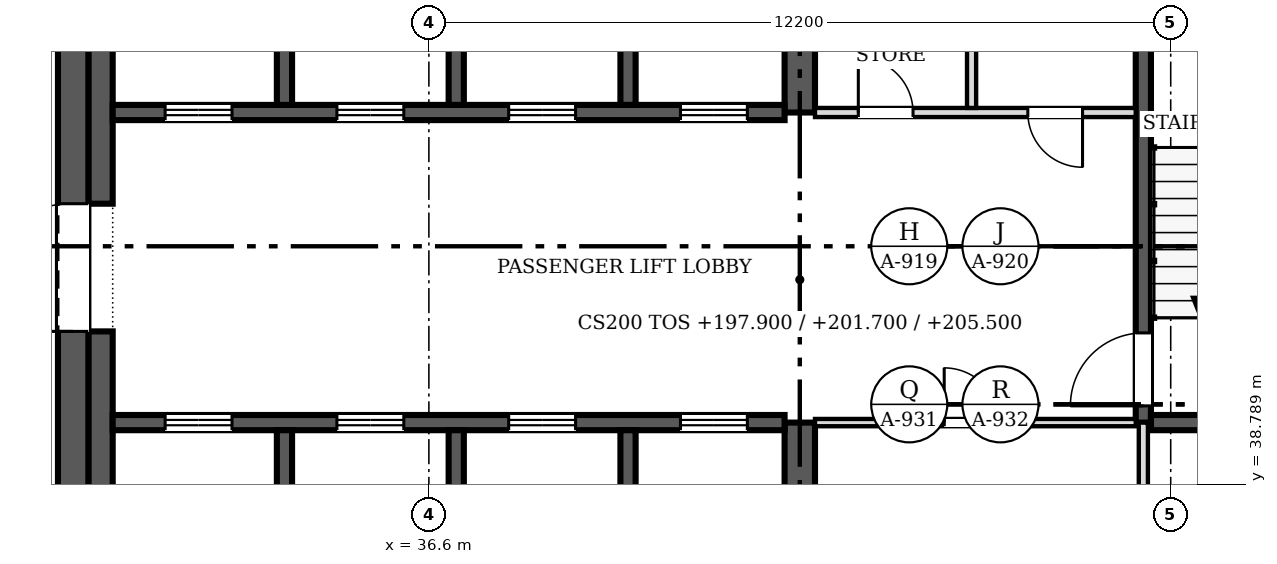
"""IFC4 building model, lengths in metres.
Left out: names, types, materials, properties, quantities, classifications, styles, units other than length and angle.
Written with IfcOpenShell. Run it as: python <this file> out.ifc"""

import sys

from ifc_helpers import new_model, si_unit, direction, frame, frame_2d, origin, place, context, subcontext, project, spatial, rectangle, extrude, source, transform, mapped, element, fill, save


model = new_model("IFC4")
c1 = context("Model", 3, precision=1e-05, world=origin(), true_north=direction((0.0, 1.0)))
c2 = subcontext(c1, "Body", "Model", "MODEL_VIEW")
j1 = project(units=[si_unit("LENGTHUNIT", "METRE"), si_unit("PLANEANGLEUNIT", "RADIAN")], contexts=[c1])
p1 = place(None, origin())
s1 = spatial("IfcSite", under=j1, at=p1, CompositionType="ELEMENT")
p2 = place(p1, origin())
s2 = spatial("IfcBuilding", under=s1, at=p2, CompositionType="ELEMENT")
p3 = place(p2, frame((0.0, 0.0, 197.9)))
s3 = spatial("IfcBuildingStorey", under=s2, at=p3, CompositionType="ELEMENT", Elevation=197.9)
p4 = place(p3, frame((30.75, 24.9, 0.0), z_axis=(0.0, 0.0, 1.0), x_axis=(0.0, 1.0, 0.0)))
e1 = element("IfcWall", 1, at=p4, inside=s3, PredefinedType="SHEAR", context=c2, shape_type="SweptSolid", body=[
    extrude(rectangle(XDim=23.4, YDim=0.5, at=frame_2d((11.7, 0.0))), origin(), (0.0, 0.0, 1.0), 3.8),
])
m1 = source(origin(), c2, "Body", "SweptSolid", [
    extrude(rectangle(XDim=2.1, YDim=2.4, at=frame_2d((1.05, 1.2))), frame((0.0, 0.26, 0.0), z_axis=(0.0, -1.0, 0.0), x_axis=(1.0, 0.0, 0.0)), (0.0, 0.0, 1.0), 0.52),
])
p5 = place(p4, frame((4.9, 0.0, 0.0)))
e2 = element("IfcOpeningElement", 2, at=p5, cuts=e1, PredefinedType="OPENING", context=c2, shape_type="MappedRepresentation", body=[
    mapped(m1, transform((0.0, 0.0, 0.0), scale=1.0)),
])
p6 = place(p4, frame((16.4, 0.0, 0.0)))
e3 = element("IfcOpeningElement", 3, at=p6, cuts=e1, PredefinedType="OPENING", context=c2, shape_type="MappedRepresentation", body=[
    mapped(m1, transform((0.0, 0.0, 0.0), scale=1.0)),
])
p7 = place(p3, frame((31.2, 31.9, 0.0), z_axis=(0.0, 0.0, 1.0), x_axis=(0.0, 1.0, 0.0)))
e4 = element("IfcWall", 4, at=p7, inside=s3, PredefinedType="SOLIDWALL", context=c2, shape_type="SweptSolid", body=[
    extrude(rectangle(XDim=9.4, YDim=0.4, at=frame_2d((4.7, 0.0))), origin(), (0.0, 0.0, 1.0), 3.8),
])
p8 = place(p3, frame((31.2, 43.4, 0.0), z_axis=(0.0, 0.0, 1.0), x_axis=(0.0, 1.0, 0.0)))
e5 = element("IfcWall", 5, at=p8, inside=s3, PredefinedType="SOLIDWALL", context=c2, shape_type="SweptSolid", body=[
    extrude(rectangle(XDim=4.5, YDim=0.4, at=frame_2d((2.25, 0.0))), origin(), (0.0, 0.0, 1.0), 3.8),
])
p9 = place(p3, frame((42.7, 36.85, 0.0), z_axis=(0.0, 0.0, 1.0), x_axis=(0.0, 1.0, 0.0)))
e6 = element("IfcWall", 6, at=p9, inside=s3, PredefinedType="SHEAR", context=c2, shape_type="SweptSolid", body=[
    extrude(rectangle(XDim=2.95, YDim=0.5, at=frame_2d((1.475, 0.0))), origin(), (0.0, 0.0, 1.0), 3.8),
])
p10 = place(p3, frame((42.7, 44.9, 0.0), z_axis=(0.0, 0.0, 1.0), x_axis=(0.0, 1.0, 0.0)))
e7 = element("IfcWall", 7, at=p10, inside=s3, PredefinedType="SHEAR", context=c2, shape_type="SweptSolid", body=[
    extrude(rectangle(XDim=3.0, YDim=0.5, at=frame_2d((1.5, 0.0))), origin(), (0.0, 0.0, 1.0), 3.8),
])
p11 = place(p3, frame((31.4, 39.8, 0.0), z_axis=(0.0, 0.0, 1.0), x_axis=(1.0, 0.0, 0.0)))
e8 = element("IfcWall", 8, at=p11, inside=s3, PredefinedType="SOLIDWALL", context=c2, shape_type="SweptSolid", body=[
    extrude(rectangle(XDim=11.05, YDim=0.25, at=frame_2d((5.525, 0.0))), origin(), (0.0, 0.0, 1.0), 3.8),
])
m2 = source(origin(), c2, "Body", "SweptSolid", [
    extrude(rectangle(XDim=1.1, YDim=2.1, at=frame_2d((0.55, 1.05))), frame((0.0, 0.135, 0.0), z_axis=(0.0, -1.0, 0.0), x_axis=(1.0, 0.0, 0.0)), (0.0, 0.0, 1.0), 0.27),
])
p12 = place(p11, frame((0.863, 0.0, 0.0)))
e9 = element("IfcOpeningElement", 9, at=p12, cuts=e8, PredefinedType="OPENING", context=c2, shape_type="MappedRepresentation", body=[
    mapped(m2, transform((0.0, 0.0, 0.0), scale=1.0)),
])
p13 = place(p11, frame((3.688, 0.0, 0.0)))
e10 = element("IfcOpeningElement", 10, at=p13, cuts=e8, PredefinedType="OPENING", context=c2, shape_type="MappedRepresentation", body=[
    mapped(m2, transform((0.0, 0.0, 0.0), scale=1.0)),
])
p14 = place(p11, frame((6.512, 0.0, 0.0)))
e11 = element("IfcOpeningElement", 11, at=p14, cuts=e8, PredefinedType="OPENING", context=c2, shape_type="MappedRepresentation", body=[
    mapped(m2, transform((0.0, 0.0, 0.0), scale=1.0)),
])
p15 = place(p11, frame((9.337, 0.0, 0.0)))
e12 = element("IfcOpeningElement", 12, at=p15, cuts=e8, PredefinedType="OPENING", context=c2, shape_type="MappedRepresentation", body=[
    mapped(m2, transform((0.0, 0.0, 0.0), scale=1.0)),
])
p16 = place(p3, frame((42.45, 44.9, 0.0), z_axis=(0.0, 0.0, 1.0), x_axis=(-1.0, 0.0, 0.0)))
e13 = element("IfcWall", 13, at=p16, inside=s3, PredefinedType="SOLIDWALL", context=c2, shape_type="SweptSolid", body=[
    extrude(rectangle(XDim=11.05, YDim=0.25, at=frame_2d((5.525, 0.0))), origin(), (0.0, 0.0, 1.0), 3.8),
])
p17 = place(p16, frame((9.087, 0.0, 0.0)))
e14 = element("IfcOpeningElement", 14, at=p17, cuts=e13, PredefinedType="OPENING", context=c2, shape_type="MappedRepresentation", body=[
    mapped(m2, transform((0.0, 0.0, 0.0), scale=1.0)),
])
p18 = place(p16, frame((6.262, 0.0, 0.0)))
e15 = element("IfcOpeningElement", 15, at=p18, cuts=e13, PredefinedType="OPENING", context=c2, shape_type="MappedRepresentation", body=[
    mapped(m2, transform((0.0, 0.0, 0.0), scale=1.0)),
])
p19 = place(p16, frame((3.438, 0.0, 0.0)))
e16 = element("IfcOpeningElement", 16, at=p19, cuts=e13, PredefinedType="OPENING", context=c2, shape_type="MappedRepresentation", body=[
    mapped(m2, transform((0.0, 0.0, 0.0), scale=1.0)),
])
p20 = place(p16, frame((0.613, 0.0, 0.0)))
e17 = element("IfcOpeningElement", 17, at=p20, cuts=e13, PredefinedType="OPENING", context=c2, shape_type="MappedRepresentation", body=[
    mapped(m2, transform((0.0, 0.0, 0.0), scale=1.0)),
])
p21 = place(p3, frame((48.35, 47.9, 0.0), z_axis=(0.0, 0.0, 1.0), x_axis=(0.0, -1.0, 0.0)))
e18 = element("IfcWall", 18, at=p21, inside=s3, PredefinedType="SOLIDWALL", context=c2, shape_type="SweptSolid", body=[
    extrude(rectangle(XDim=8.1, YDim=0.25, at=frame_2d((4.05, 0.0))), origin(), (0.0, 0.0, 1.0), 3.8),
])
m3 = source(origin(), c2, "Body", "SweptSolid", [
    extrude(rectangle(XDim=1.2, YDim=2.1, at=frame_2d((0.6, 1.05))), frame((0.0, 0.135, 0.0), z_axis=(0.0, -1.0, 0.0), x_axis=(1.0, 0.0, 0.0)), (0.0, 0.0, 1.0), 0.27),
])
p22 = place(p21, frame((6.625, 0.0, 0.0)))
e19 = element("IfcOpeningElement", 19, at=p22, cuts=e18, PredefinedType="OPENING", context=c2, shape_type="MappedRepresentation", body=[
    mapped(m3, transform((0.0, 0.0, 0.0), scale=1.0)),
])
p23 = place(p3, frame((48.475, 39.8, 0.0), z_axis=(0.0, 0.0, 1.0), x_axis=(1.0, 0.0, 0.0)))
e20 = element("IfcWall", 20, at=p23, inside=s3, PredefinedType="SOLIDWALL", context=c2, shape_type="SweptSolid", body=[
    extrude(rectangle(XDim=3.4, YDim=0.25, at=frame_2d((1.7, 0.0))), origin(), (0.0, 0.0, 1.0), 3.8),
])
for number, where, z_axis, x_axis in (
    (21, (34.225, 36.85, 0.0), (0.0, 0.0, 1.0), (0.0, 1.0, 0.0)),
    (22, (37.05, 36.85, 0.0), (0.0, 0.0, 1.0), (0.0, 1.0, 0.0)),
    (23, (39.875, 36.85, 0.0), (0.0, 0.0, 1.0), (0.0, 1.0, 0.0)),
):
    element("IfcWall", number, at=place(p3, frame(where, z_axis=z_axis, x_axis=x_axis)), inside=s3, PredefinedType="SOLIDWALL", context=c2, shape_type="SweptSolid", body=[
        extrude(rectangle(XDim=2.825, YDim=0.25, at=frame_2d((1.413, 0.0))), origin(), (0.0, 0.0, 1.0), 3.8),
    ])
for number, where, z_axis, x_axis in (
    (24, (34.225, 45.025, 0.0), (0.0, 0.0, 1.0), (0.0, 1.0, 0.0)),
    (25, (37.05, 45.025, 0.0), (0.0, 0.0, 1.0), (0.0, 1.0, 0.0)),
    (26, (39.875, 45.025, 0.0), (0.0, 0.0, 1.0), (0.0, 1.0, 0.0)),
):
    element("IfcWall", number, at=place(p3, frame(where, z_axis=z_axis, x_axis=x_axis)), inside=s3, PredefinedType="SOLIDWALL", context=c2, shape_type="SweptSolid", body=[
        extrude(rectangle(XDim=2.875, YDim=0.25, at=frame_2d((1.438, 0.0))), origin(), (0.0, 0.0, 1.0), 3.8),
    ])
p24 = place(p3, frame((48.225, 39.8, 0.0), z_axis=(0.0, 0.0, 1.0), x_axis=(-1.0, 0.0, 0.0)))
e27 = element("IfcWall", 27, at=p24, inside=s3, PredefinedType="PARTITIONING", context=c2, shape_type="SweptSolid", body=[
    extrude(rectangle(XDim=5.275, YDim=0.12, at=frame_2d((2.638, 0.0))), origin(), (0.0, 0.0, 1.0), 3.6),
])
m4 = source(origin(), c2, "Body", "SweptSolid", [
    extrude(rectangle(XDim=0.9, YDim=2.1, at=frame_2d((0.45, 1.05))), frame((0.0, 0.07, 0.0), z_axis=(0.0, -1.0, 0.0), x_axis=(1.0, 0.0, 0.0)), (0.0, 0.0, 1.0), 0.14),
])
p25 = place(p24, frame((2.25, 0.0, 0.0)))
e28 = element("IfcOpeningElement", 28, at=p25, cuts=e27, PredefinedType="OPENING", context=c2, shape_type="MappedRepresentation", body=[
    mapped(m4, transform((0.0, 0.0, 0.0), scale=1.0)),
])
p26 = place(p3, frame((42.95, 44.9, 0.0), z_axis=(0.0, 0.0, 1.0), x_axis=(1.0, 0.0, 0.0)))
e29 = element("IfcWall", 29, at=p26, inside=s3, PredefinedType="PARTITIONING", context=c2, shape_type="SweptSolid", body=[
    extrude(rectangle(XDim=5.275, YDim=0.15, at=frame_2d((2.638, 0.0))), origin(), (0.0, 0.0, 1.0), 3.6),
])
m5 = source(origin(), c2, "Body", "SweptSolid", [
    extrude(rectangle(XDim=0.9, YDim=2.1, at=frame_2d((0.45, 1.05))), frame((0.0, 0.085, 0.0), z_axis=(0.0, -1.0, 0.0), x_axis=(1.0, 0.0, 0.0)), (0.0, 0.0, 1.0), 0.17),
])
p27 = place(p26, frame((0.712, 0.0, 0.0)))
e30 = element("IfcOpeningElement", 30, at=p27, cuts=e29, PredefinedType="OPENING", context=c2, shape_type="MappedRepresentation", body=[
    mapped(m5, transform((0.0, 0.0, 0.0), scale=1.0)),
])
p28 = place(p26, frame((3.5, 0.0, 0.0)))
e31 = element("IfcOpeningElement", 31, at=p28, cuts=e29, PredefinedType="OPENING", context=c2, shape_type="MappedRepresentation", body=[
    mapped(m5, transform((0.0, 0.0, 0.0), scale=1.0)),
])
p29 = place(p3, frame((48.35, 36.85, 0.0), z_axis=(0.0, 0.0, 1.0), x_axis=(0.0, 1.0, 0.0)))
e32 = element("IfcWall", 32, at=p29, inside=s3, PredefinedType="PARTITIONING", context=c2, shape_type="SweptSolid", body=[
    extrude(rectangle(XDim=2.95, YDim=0.15, at=frame_2d((1.475, 0.0))), origin(), (0.0, 0.0, 1.0), 3.6),
])
p30 = place(p3, frame((45.525, 44.975, 0.0), z_axis=(0.0, 0.0, 1.0), x_axis=(0.0, 1.0, 0.0)))
e33 = element("IfcWall", 33, at=p30, inside=s3, PredefinedType="PARTITIONING", context=c2, shape_type="SweptSolid", body=[
    extrude(rectangle(XDim=2.925, YDim=0.15, at=frame_2d((1.462, 0.0))), origin(), (0.0, 0.0, 1.0), 3.6),
])
m6 = source(origin(), c2, "Body", "SweptSolid", [
    extrude(rectangle(XDim=2.1, YDim=2.4, at=frame_2d((1.05, 1.2))), frame((0.0, 0.025, 0.0), z_axis=(0.0, -1.0, 0.0), x_axis=(1.0, 0.0, 0.0)), (0.0, 0.0, 1.0), 0.05),
])
p31 = place(p6, origin())
e34 = element("IfcDoor", 34, at=p31, inside=s3, OperationType="DOUBLE_DOOR_SINGLE_SWING", PredefinedType="DOOR", context=c2, shape_type="MappedRepresentation", body=[
    mapped(m6, transform((0.0, 0.0, 0.0), scale=1.0)),
])
fill(e3, e34)
m7 = source(origin(), c2, "Body", "SweptSolid", [
    extrude(rectangle(XDim=1.1, YDim=2.1, at=frame_2d((0.55, 1.05))), frame((0.0, 0.025, 0.0), z_axis=(0.0, -1.0, 0.0), x_axis=(1.0, 0.0, 0.0)), (0.0, 0.0, 1.0), 0.05),
])
p32 = place(p12, origin())
e35 = element("IfcDoor", 35, at=p32, inside=s3, OperationType="DOUBLE_DOOR_SLIDING", PredefinedType="DOOR", context=c2, shape_type="MappedRepresentation", body=[
    mapped(m7, transform((0.0, 0.0, 0.0), scale=1.0)),
])
fill(e9, e35)
p33 = place(p13, origin())
e36 = element("IfcDoor", 36, at=p33, inside=s3, OperationType="DOUBLE_DOOR_SLIDING", PredefinedType="DOOR", context=c2, shape_type="MappedRepresentation", body=[
    mapped(m7, transform((0.0, 0.0, 0.0), scale=1.0)),
])
fill(e10, e36)
p34 = place(p14, origin())
e37 = element("IfcDoor", 37, at=p34, inside=s3, OperationType="DOUBLE_DOOR_SLIDING", PredefinedType="DOOR", context=c2, shape_type="MappedRepresentation", body=[
    mapped(m7, transform((0.0, 0.0, 0.0), scale=1.0)),
])
fill(e11, e37)
p35 = place(p15, origin())
e38 = element("IfcDoor", 38, at=p35, inside=s3, OperationType="DOUBLE_DOOR_SLIDING", PredefinedType="DOOR", context=c2, shape_type="MappedRepresentation", body=[
    mapped(m7, transform((0.0, 0.0, 0.0), scale=1.0)),
])
fill(e12, e38)
p36 = place(p17, origin())
e39 = element("IfcDoor", 39, at=p36, inside=s3, OperationType="DOUBLE_DOOR_SLIDING", PredefinedType="DOOR", context=c2, shape_type="MappedRepresentation", body=[
    mapped(m7, transform((0.0, 0.0, 0.0), scale=1.0)),
])
fill(e14, e39)
p37 = place(p18, origin())
e40 = element("IfcDoor", 40, at=p37, inside=s3, OperationType="DOUBLE_DOOR_SLIDING", PredefinedType="DOOR", context=c2, shape_type="MappedRepresentation", body=[
    mapped(m7, transform((0.0, 0.0, 0.0), scale=1.0)),
])
fill(e15, e40)
p38 = place(p19, origin())
e41 = element("IfcDoor", 41, at=p38, inside=s3, OperationType="DOUBLE_DOOR_SLIDING", PredefinedType="DOOR", context=c2, shape_type="MappedRepresentation", body=[
    mapped(m7, transform((0.0, 0.0, 0.0), scale=1.0)),
])
fill(e16, e41)
p39 = place(p20, origin())
e42 = element("IfcDoor", 42, at=p39, inside=s3, OperationType="DOUBLE_DOOR_SLIDING", PredefinedType="DOOR", context=c2, shape_type="MappedRepresentation", body=[
    mapped(m7, transform((0.0, 0.0, 0.0), scale=1.0)),
])
fill(e17, e42)
m8 = source(origin(), c2, "Body", "SweptSolid", [
    extrude(rectangle(XDim=1.2, YDim=2.1, at=frame_2d((0.6, 1.05))), frame((0.0, 0.025, 0.0), z_axis=(0.0, -1.0, 0.0), x_axis=(1.0, 0.0, 0.0)), (0.0, 0.0, 1.0), 0.05),
])
p40 = place(p22, origin())
e43 = element("IfcDoor", 43, at=p40, inside=s3, OperationType="SINGLE_SWING_RIGHT", PredefinedType="DOOR", context=c2, shape_type="MappedRepresentation", body=[
    mapped(m8, transform((0.0, 0.0, 0.0), scale=1.0)),
])
fill(e19, e43)
m9 = source(origin(), c2, "Body", "SweptSolid", [
    extrude(rectangle(XDim=0.9, YDim=2.1, at=frame_2d((0.45, 1.05))), frame((0.0, 0.025, 0.0), z_axis=(0.0, -1.0, 0.0), x_axis=(1.0, 0.0, 0.0)), (0.0, 0.0, 1.0), 0.05),
])
p41 = place(p25, origin())
e44 = element("IfcDoor", 44, at=p41, inside=s3, OperationType="SINGLE_SWING_RIGHT", PredefinedType="DOOR", context=c2, shape_type="MappedRepresentation", body=[
    mapped(m9, transform((0.0, 0.0, 0.0), scale=1.0)),
])
fill(e28, e44)
p42 = place(p27, origin())
e45 = element("IfcDoor", 45, at=p42, inside=s3, OperationType="SINGLE_SWING_LEFT", PredefinedType="DOOR", context=c2, shape_type="MappedRepresentation", body=[
    mapped(m9, transform((0.0, 0.0, 0.0), scale=1.0)),
])
fill(e30, e45)
p43 = place(p28, origin())
e46 = element("IfcDoor", 46, at=p43, inside=s3, OperationType="SINGLE_SWING_RIGHT", PredefinedType="DOOR", context=c2, shape_type="MappedRepresentation", body=[
    mapped(m9, transform((0.0, 0.0, 0.0), scale=1.0)),
])
fill(e31, e46)
save(model, sys.argv[1])
